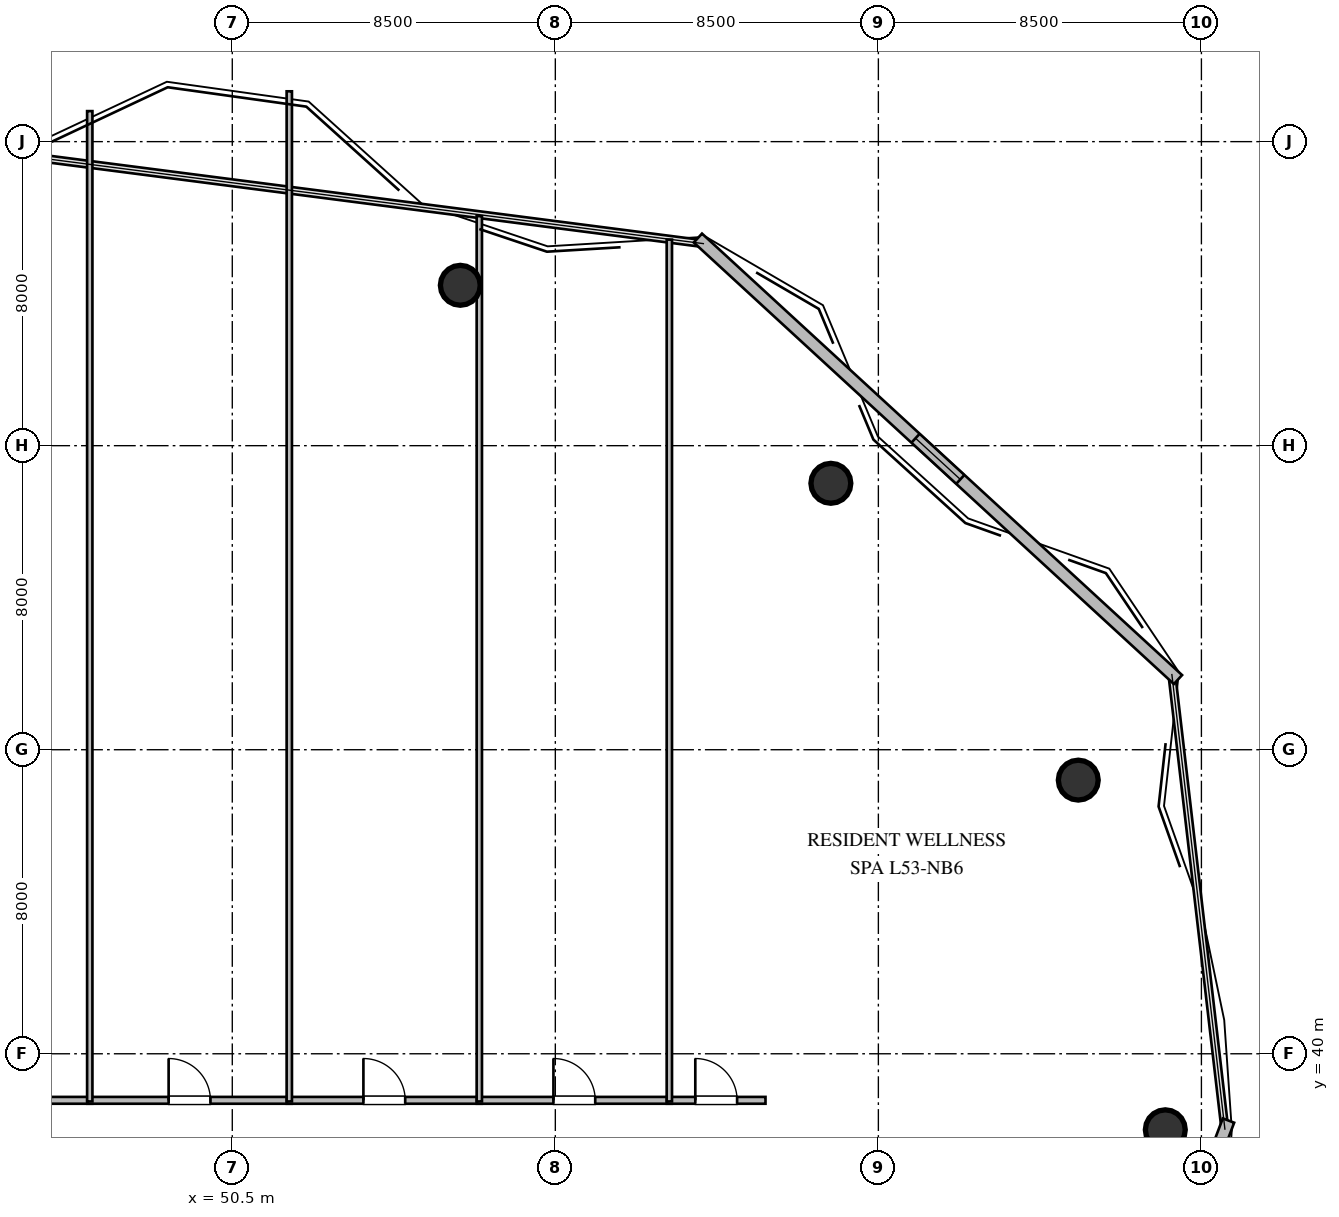
"""IFC4 building model, lengths in metres.
Left out: names, types, materials, properties, quantities, classifications, styles, units other than length and angle.
Written with IfcOpenShell. Run it as: python <this file> out.ifc"""

import sys

from ifc_helpers import new_model, si_unit, direction, frame, frame_2d, origin, origin_2d, place, context, subcontext, project, spatial, rectangle, circle, extrude, element, fill, save


model = new_model("IFC4")
c1 = context("Model", 3, precision=1e-05, world=origin(), true_north=direction((0.0, 1.0)))
c2 = subcontext(c1, "Body", "Model", "MODEL_VIEW")
j1 = project(units=[si_unit("LENGTHUNIT", "METRE"), si_unit("PLANEANGLEUNIT", "RADIAN")], contexts=[c1])
p1 = place(None, origin())
s1 = spatial("IfcSite", under=j1, at=p1, CompositionType="ELEMENT")
p2 = place(p1, origin())
s2 = spatial("IfcBuilding", under=s1, at=p2, CompositionType="ELEMENT")
p3 = place(p2, frame((0.0, 0.0, 202.8)))
s3 = spatial("IfcBuildingStorey", under=s2, at=p3, CompositionType="ELEMENT", Elevation=202.8)
for number, where, z_axis, x_axis in (
    (1, (75.05, 38.0, 0.0), (0.0, 0.0, 1.0), (1.0, 0.0, 0.0)),
    (2, (72.76, 47.2, 0.0), (0.0, 0.0, 1.0), (1.0, 0.0, 0.0)),
    (3, (66.25, 55.01, 0.0), (0.0, 0.0, 1.0), (1.0, 0.0, 0.0)),
    (4, (56.5, 60.22, 0.0), (0.0, 0.0, 1.0), (1.0, 0.0, 0.0)),
):
    element("IfcColumn", number, at=place(p3, frame(where, z_axis=z_axis, x_axis=x_axis)), inside=s3, PredefinedType="COLUMN", context=c2, shape_type="SweptSolid", body=[
        extrude(circle(Radius=0.525, at=origin_2d()), origin(), (0.0, 0.0, 1.0), 3.6),
    ])
p4 = place(p3, frame((76.712, 38.243, 0.0), z_axis=(0.0, 0.0, 1.0), x_axis=(-0.353659523244, -0.935374225441, 0.0)))
e5 = element("IfcWall", 5, at=p4, inside=s3, PredefinedType="STANDARD", context=c2, shape_type="SweptSolid", body=[
    extrude(rectangle(XDim=14.172, YDim=0.32, at=frame_2d((7.086, 0.0))), origin(), (0.0, 0.0, 1.0), 3.36),
])
p5 = place(p3, frame((62.751, 61.463, 0.0), z_axis=(0.0, 0.0, 1.0), x_axis=(0.736063690764, -0.676912286149, 0.0)))
e6 = element("IfcWall", 6, at=p5, inside=s3, PredefinedType="STANDARD", context=c2, shape_type="SweptSolid", body=[
    extrude(rectangle(XDim=17.162, YDim=0.32, at=frame_2d((8.581, 0.0))), origin(), (0.0, 0.0, 1.0), 3.36),
])
p6 = place(p5, frame((7.781, 0.0, 1.05)))
e7 = element("IfcOpeningElement", 7, at=p6, cuts=e6, PredefinedType="OPENING", context=c2, shape_type="SweptSolid", body=[
    extrude(rectangle(XDim=1.6, YDim=1.5, at=frame_2d((0.8, 0.75))), frame((0.0, 0.17, 0.0), z_axis=(0.0, -1.0, 0.0), x_axis=(1.0, 0.0, 0.0)), (0.0, 0.0, 1.0), 0.34),
])
p7 = place(p3, frame((41.435, 38.775, 0.0), z_axis=(0.0, 0.0, 1.0), x_axis=(1.0, 0.0, 0.0)))
e8 = element("IfcWall", 8, at=p7, inside=s3, PredefinedType="PARTITIONING", context=c2, shape_type="SweptSolid", body=[
    extrude(rectangle(XDim=5.38, YDim=0.18, at=frame_2d((2.69, 0.0))), origin(), (0.0, 0.0, 1.0), 3.36),
])
p8 = place(p7, frame((2.14, 0.0, 0.0)))
e9 = element("IfcOpeningElement", 9, at=p8, cuts=e8, PredefinedType="OPENING", context=c2, shape_type="SweptSolid", body=[
    extrude(rectangle(XDim=1.1, YDim=2.1, at=frame_2d((0.55, 1.05))), frame((0.0, 0.1, 0.0), z_axis=(0.0, -1.0, 0.0), x_axis=(1.0, 0.0, 0.0)), (0.0, 0.0, 1.0), 0.2),
])
p9 = place(p3, frame((46.685, 38.775, 0.0), z_axis=(0.0, 0.0, 1.0), x_axis=(1.0, 0.0, 0.0)))
e10 = element("IfcWall", 10, at=p9, inside=s3, PredefinedType="PARTITIONING", context=c2, shape_type="SweptSolid", body=[
    extrude(rectangle(XDim=5.38, YDim=0.18, at=frame_2d((2.69, 0.0))), origin(), (0.0, 0.0, 1.0), 3.36),
])
p10 = place(p9, frame((2.14, 0.0, 0.0)))
e11 = element("IfcOpeningElement", 11, at=p10, cuts=e10, PredefinedType="OPENING", context=c2, shape_type="SweptSolid", body=[
    extrude(rectangle(XDim=1.1, YDim=2.1, at=frame_2d((0.55, 1.05))), frame((0.0, 0.1, 0.0), z_axis=(0.0, -1.0, 0.0), x_axis=(1.0, 0.0, 0.0)), (0.0, 0.0, 1.0), 0.2),
])
p11 = place(p3, frame((51.935, 38.775, 0.0), z_axis=(0.0, 0.0, 1.0), x_axis=(1.0, 0.0, 0.0)))
e12 = element("IfcWall", 12, at=p11, inside=s3, PredefinedType="PARTITIONING", context=c2, shape_type="SweptSolid", body=[
    extrude(rectangle(XDim=5.13, YDim=0.18, at=frame_2d((2.565, 0.0))), origin(), (0.0, 0.0, 1.0), 3.36),
])
p12 = place(p11, frame((2.015, 0.0, 0.0)))
e13 = element("IfcOpeningElement", 13, at=p12, cuts=e12, PredefinedType="OPENING", context=c2, shape_type="SweptSolid", body=[
    extrude(rectangle(XDim=1.1, YDim=2.1, at=frame_2d((0.55, 1.05))), frame((0.0, 0.1, 0.0), z_axis=(0.0, -1.0, 0.0), x_axis=(1.0, 0.0, 0.0)), (0.0, 0.0, 1.0), 0.2),
])
p13 = place(p3, frame((56.935, 38.775, 0.0), z_axis=(0.0, 0.0, 1.0), x_axis=(1.0, 0.0, 0.0)))
e14 = element("IfcWall", 14, at=p13, inside=s3, PredefinedType="PARTITIONING", context=c2, shape_type="SweptSolid", body=[
    extrude(rectangle(XDim=5.13, YDim=0.18, at=frame_2d((2.565, 0.0))), origin(), (0.0, 0.0, 1.0), 3.36),
])
p14 = place(p13, frame((2.015, 0.0, 0.0)))
e15 = element("IfcOpeningElement", 15, at=p14, cuts=e14, PredefinedType="OPENING", context=c2, shape_type="SweptSolid", body=[
    extrude(rectangle(XDim=1.1, YDim=2.1, at=frame_2d((0.55, 1.05))), frame((0.0, 0.1, 0.0), z_axis=(0.0, -1.0, 0.0), x_axis=(1.0, 0.0, 0.0)), (0.0, 0.0, 1.0), 0.2),
])
p15 = place(p3, frame((61.935, 38.775, 0.0), z_axis=(0.0, 0.0, 1.0), x_axis=(1.0, 0.0, 0.0)))
e16 = element("IfcWall", 16, at=p15, inside=s3, PredefinedType="PARTITIONING", context=c2, shape_type="SweptSolid", body=[
    extrude(rectangle(XDim=2.595, YDim=0.18, at=frame_2d((1.297, 0.0))), origin(), (0.0, 0.0, 1.0), 3.36),
])
p16 = place(p15, frame((0.748, 0.0, 0.0)))
e17 = element("IfcOpeningElement", 17, at=p16, cuts=e16, PredefinedType="OPENING", context=c2, shape_type="SweptSolid", body=[
    extrude(rectangle(XDim=1.1, YDim=2.1, at=frame_2d((0.55, 1.05))), frame((0.0, 0.1, 0.0), z_axis=(0.0, -1.0, 0.0), x_axis=(1.0, 0.0, 0.0)), (0.0, 0.0, 1.0), 0.2),
])
p17 = place(p3, frame((46.75, 64.803, 0.0), z_axis=(0.0, 0.0, 1.0), x_axis=(0.0, -1.0, 0.0)))
e18 = element("IfcWall", 18, at=p17, inside=s3, PredefinedType="PARTITIONING", context=c2, shape_type="SweptSolid", body=[
    extrude(rectangle(XDim=26.058, YDim=0.14, at=frame_2d((13.029, 0.0))), origin(), (0.0, 0.0, 1.0), 3.36),
])
p18 = place(p3, frame((52.0, 65.324, 0.0), z_axis=(0.0, 0.0, 1.0), x_axis=(0.0, -1.0, 0.0)))
e19 = element("IfcWall", 19, at=p18, inside=s3, PredefinedType="PARTITIONING", context=c2, shape_type="SweptSolid", body=[
    extrude(rectangle(XDim=26.579, YDim=0.14, at=frame_2d((13.29, 0.0))), origin(), (0.0, 0.0, 1.0), 3.36),
])
p19 = place(p3, frame((57.0, 62.039, 0.0), z_axis=(0.0, 0.0, 1.0), x_axis=(0.0, -1.0, 0.0)))
e20 = element("IfcWall", 20, at=p19, inside=s3, PredefinedType="PARTITIONING", context=c2, shape_type="SweptSolid", body=[
    extrude(rectangle(XDim=23.294, YDim=0.14, at=frame_2d((11.647, 0.0))), origin(), (0.0, 0.0, 1.0), 3.36),
])
p20 = place(p3, frame((62.0, 61.422, 0.0), z_axis=(0.0, 0.0, 1.0), x_axis=(0.0, -1.0, 0.0)))
e21 = element("IfcWall", 21, at=p20, inside=s3, PredefinedType="PARTITIONING", context=c2, shape_type="SweptSolid", body=[
    extrude(rectangle(XDim=22.677, YDim=0.14, at=frame_2d((11.338, 0.0))), origin(), (0.0, 0.0, 1.0), 3.36),
])
p21 = place(p6, origin())
e22 = element("IfcWindow", 22, at=p21, inside=s3, PartitioningType="SINGLE_PANEL", PredefinedType="WINDOW", context=c2, shape_type="SweptSolid", body=[
    extrude(rectangle(XDim=1.6, YDim=1.5, at=frame_2d((0.8, 0.75))), frame((0.0, 0.03, 0.0), z_axis=(0.0, -1.0, 0.0), x_axis=(1.0, 0.0, 0.0)), (0.0, 0.0, 1.0), 0.06),
])
fill(e7, e22)
p22 = place(p10, origin())
e23 = element("IfcDoor", 23, at=p22, inside=s3, OperationType="SINGLE_SWING_LEFT", PredefinedType="DOOR", context=c2, shape_type="SweptSolid", body=[
    extrude(rectangle(XDim=1.1, YDim=2.1, at=frame_2d((0.55, 1.05))), frame((0.0, 0.025, 0.0), z_axis=(0.0, -1.0, 0.0), x_axis=(1.0, 0.0, 0.0)), (0.0, 0.0, 1.0), 0.05),
])
fill(e11, e23)
p23 = place(p12, origin())
e24 = element("IfcDoor", 24, at=p23, inside=s3, OperationType="SINGLE_SWING_LEFT", PredefinedType="DOOR", context=c2, shape_type="SweptSolid", body=[
    extrude(rectangle(XDim=1.1, YDim=2.1, at=frame_2d((0.55, 1.05))), frame((0.0, 0.025, 0.0), z_axis=(0.0, -1.0, 0.0), x_axis=(1.0, 0.0, 0.0)), (0.0, 0.0, 1.0), 0.05),
])
fill(e13, e24)
p24 = place(p14, origin())
e25 = element("IfcDoor", 25, at=p24, inside=s3, OperationType="SINGLE_SWING_LEFT", PredefinedType="DOOR", context=c2, shape_type="SweptSolid", body=[
    extrude(rectangle(XDim=1.1, YDim=2.1, at=frame_2d((0.55, 1.05))), frame((0.0, 0.025, 0.0), z_axis=(0.0, -1.0, 0.0), x_axis=(1.0, 0.0, 0.0)), (0.0, 0.0, 1.0), 0.05),
])
fill(e15, e25)
p25 = place(p16, origin())
e26 = element("IfcDoor", 26, at=p25, inside=s3, OperationType="SINGLE_SWING_LEFT", PredefinedType="DOOR", context=c2, shape_type="SweptSolid", body=[
    extrude(rectangle(XDim=1.1, YDim=2.1, at=frame_2d((0.55, 1.05))), frame((0.0, 0.025, 0.0), z_axis=(0.0, -1.0, 0.0), x_axis=(1.0, 0.0, 0.0)), (0.0, 0.0, 1.0), 0.05),
])
fill(e17, e26)
save(model, sys.argv[1])
